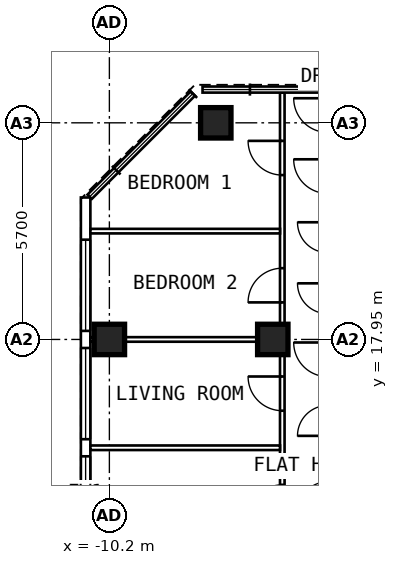
"""IFC4 building model, lengths in metres.
Left out: names, types, materials, properties, quantities, classifications, styles, units other than length and angle.
Written with IfcOpenShell. Run it as: python <this file> out.ifc"""

import sys

from ifc_helpers import new_model, si_unit, direction, frame, frame_2d, origin, origin_2d, place, context, subcontext, project, spatial, rectangle, extrude, element, fill, save


model = new_model("IFC4")
c1 = context("Model", 3, precision=1e-05, world=origin(), true_north=direction((0.0, 1.0)))
c2 = subcontext(c1, "Body", "Model", "MODEL_VIEW")
j1 = project(units=[si_unit("LENGTHUNIT", "METRE"), si_unit("PLANEANGLEUNIT", "RADIAN")], contexts=[c1])
p1 = place(None, origin())
s1 = spatial("IfcSite", under=j1, at=p1, CompositionType="ELEMENT")
p2 = place(p1, origin())
s2 = spatial("IfcBuilding", under=s1, at=p2, CompositionType="ELEMENT")
p3 = place(p2, frame((0.0, 0.0, 292.6)))
s3 = spatial("IfcBuildingStorey", under=s2, at=p3, CompositionType="ELEMENT", Elevation=292.6)
for number, where, z_axis, x_axis in (
    (1, (-10.2, 17.95, 0.0), (0.0, 0.0, 1.0), (0.0, 1.0, 0.0)),
    (2, (-7.4, 23.65, 0.0), (0.0, 0.0, 1.0), (0.0, 1.0, 0.0)),
    (3, (-5.9, 17.95, 0.0), (0.0, 0.0, 1.0), (0.0, 1.0, 0.0)),
):
    element("IfcColumn", number, at=place(p3, frame(where, z_axis=z_axis, x_axis=x_axis)), inside=s3, PredefinedType="COLUMN", context=c2, shape_type="SweptSolid", body=[
        extrude(rectangle(XDim=0.8, YDim=0.8, at=origin_2d()), origin(), (0.0, 0.0, 1.0), 3.6),
    ])
p4 = place(p3, frame((-10.825, 6.148, 0.0), z_axis=(0.0, 0.0, 1.0), x_axis=(0.0, 1.0, 0.0)))
e4 = element("IfcWall", 4, at=p4, inside=s3, PredefinedType="SOLIDWALL", context=c2, shape_type="SweptSolid", body=[
    extrude(rectangle(XDim=15.537, YDim=0.25, at=frame_2d((7.769, 0.0))), origin(), (0.0, 0.0, 1.0), 3.35),
])
p5 = place(p4, frame((0.627, 0.0, 0.6)))
e5 = element("IfcOpeningElement", 5, at=p5, cuts=e4, PredefinedType="OPENING", context=c2, shape_type="SweptSolid", body=[
    extrude(rectangle(XDim=2.4, YDim=2.0, at=frame_2d((1.2, 1.0))), frame((0.0, 0.137, 0.0), z_axis=(0.0, -1.0, 0.0), x_axis=(1.0, 0.0, 0.0)), (0.0, 0.0, 1.0), 0.274),
])
p6 = place(p4, frame((3.477, 0.0, 0.6)))
e6 = element("IfcOpeningElement", 6, at=p6, cuts=e4, PredefinedType="OPENING", context=c2, shape_type="SweptSolid", body=[
    extrude(rectangle(XDim=2.4, YDim=2.0, at=frame_2d((1.2, 1.0))), frame((0.0, 0.137, 0.0), z_axis=(0.0, -1.0, 0.0), x_axis=(1.0, 0.0, 0.0)), (0.0, 0.0, 1.0), 0.274),
])
p7 = place(p4, frame((6.327, 0.0, 0.6)))
e7 = element("IfcOpeningElement", 7, at=p7, cuts=e4, PredefinedType="OPENING", context=c2, shape_type="SweptSolid", body=[
    extrude(rectangle(XDim=2.4, YDim=2.0, at=frame_2d((1.2, 1.0))), frame((0.0, 0.137, 0.0), z_axis=(0.0, -1.0, 0.0), x_axis=(1.0, 0.0, 0.0)), (0.0, 0.0, 1.0), 0.274),
])
p8 = place(p4, frame((9.177, 0.0, 0.6)))
e8 = element("IfcOpeningElement", 8, at=p8, cuts=e4, PredefinedType="OPENING", context=c2, shape_type="SweptSolid", body=[
    extrude(rectangle(XDim=2.4, YDim=2.0, at=frame_2d((1.2, 1.0))), frame((0.0, 0.137, 0.0), z_axis=(0.0, -1.0, 0.0), x_axis=(1.0, 0.0, 0.0)), (0.0, 0.0, 1.0), 0.274),
])
p9 = place(p4, frame((12.027, 0.0, 0.6)))
e9 = element("IfcOpeningElement", 9, at=p9, cuts=e4, PredefinedType="OPENING", context=c2, shape_type="SweptSolid", body=[
    extrude(rectangle(XDim=2.4, YDim=2.0, at=frame_2d((1.2, 1.0))), frame((0.0, 0.137, 0.0), z_axis=(0.0, -1.0, 0.0), x_axis=(1.0, 0.0, 0.0)), (0.0, 0.0, 1.0), 0.274),
])
p10 = place(p3, frame((-5.65, 9.6, 0.0), z_axis=(0.0, 0.0, 1.0), x_axis=(0.0, 1.0, 0.0)))
e10 = element("IfcWall", 10, at=p10, inside=s3, PredefinedType="PARTITIONING", context=c2, shape_type="SweptSolid", body=[
    extrude(rectangle(XDim=14.845, YDim=0.12, at=frame_2d((7.422, 0.0))), origin(), (0.0, 0.0, 1.0), 3.35),
])
p11 = place(p10, frame((1.075, 0.0, 0.0)))
e11 = element("IfcOpeningElement", 11, at=p11, cuts=e10, PredefinedType="OPENING", context=c2, shape_type="SweptSolid", body=[
    extrude(rectangle(XDim=0.9, YDim=2.1, at=frame_2d((0.45, 1.05))), frame((0.0, 0.072, 0.0), z_axis=(0.0, -1.0, 0.0), x_axis=(1.0, 0.0, 0.0)), (0.0, 0.0, 1.0), 0.144),
])
p12 = place(p10, frame((3.625, 0.0, 0.0)))
e12 = element("IfcOpeningElement", 12, at=p12, cuts=e10, PredefinedType="OPENING", context=c2, shape_type="SweptSolid", body=[
    extrude(rectangle(XDim=0.9, YDim=2.1, at=frame_2d((0.45, 1.05))), frame((0.0, 0.072, 0.0), z_axis=(0.0, -1.0, 0.0), x_axis=(1.0, 0.0, 0.0)), (0.0, 0.0, 1.0), 0.144),
])
p13 = place(p10, frame((6.475, 0.0, 0.0)))
e13 = element("IfcOpeningElement", 13, at=p13, cuts=e10, PredefinedType="OPENING", context=c2, shape_type="SweptSolid", body=[
    extrude(rectangle(XDim=0.9, YDim=2.1, at=frame_2d((0.45, 1.05))), frame((0.0, 0.072, 0.0), z_axis=(0.0, -1.0, 0.0), x_axis=(1.0, 0.0, 0.0)), (0.0, 0.0, 1.0), 0.144),
])
p14 = place(p10, frame((9.325, 0.0, 0.0)))
e14 = element("IfcOpeningElement", 14, at=p14, cuts=e10, PredefinedType="OPENING", context=c2, shape_type="SweptSolid", body=[
    extrude(rectangle(XDim=0.9, YDim=2.1, at=frame_2d((0.45, 1.05))), frame((0.0, 0.072, 0.0), z_axis=(0.0, -1.0, 0.0), x_axis=(1.0, 0.0, 0.0)), (0.0, 0.0, 1.0), 0.144),
])
p15 = place(p10, frame((12.675, 0.0, 0.0)))
e15 = element("IfcOpeningElement", 15, at=p15, cuts=e10, PredefinedType="OPENING", context=c2, shape_type="SweptSolid", body=[
    extrude(rectangle(XDim=0.9, YDim=2.1, at=frame_2d((0.45, 1.05))), frame((0.0, 0.072, 0.0), z_axis=(0.0, -1.0, 0.0), x_axis=(1.0, 0.0, 0.0)), (0.0, 0.0, 1.0), 0.144),
])
p16 = place(p3, frame((-5.71, 15.1, 0.0), z_axis=(0.0, 0.0, 1.0), x_axis=(-1.0, 0.0, 0.0)))
e16 = element("IfcWall", 16, at=p16, inside=s3, PredefinedType="PARTITIONING", context=c2, shape_type="SweptSolid", body=[
    extrude(rectangle(XDim=4.99, YDim=0.12, at=frame_2d((2.495, 0.0))), origin(), (0.0, 0.0, 1.0), 3.35),
])
p17 = place(p3, frame((-5.71, 17.95, 0.0), z_axis=(0.0, 0.0, 1.0), x_axis=(-1.0, 0.0, 0.0)))
e17 = element("IfcWall", 17, at=p17, inside=s3, PredefinedType="PARTITIONING", context=c2, shape_type="SweptSolid", body=[
    extrude(rectangle(XDim=4.99, YDim=0.12, at=frame_2d((2.495, 0.0))), origin(), (0.0, 0.0, 1.0), 2.45),
])
p18 = place(p3, frame((-5.71, 20.8, 0.0), z_axis=(0.0, 0.0, 1.0), x_axis=(-1.0, 0.0, 0.0)))
e18 = element("IfcWall", 18, at=p18, inside=s3, PredefinedType="PARTITIONING", context=c2, shape_type="SweptSolid", body=[
    extrude(rectangle(XDim=4.99, YDim=0.12, at=frame_2d((2.495, 0.0))), origin(), (0.0, 0.0, 1.0), 3.35),
])
p19 = place(p7, origin())
e19 = element("IfcWindow", 19, at=p19, inside=s3, PartitioningType="SINGLE_PANEL", PredefinedType="WINDOW", context=c2, shape_type="SweptSolid", body=[
    extrude(rectangle(XDim=2.4, YDim=2.0, at=frame_2d((1.2, 1.0))), frame((0.0, 0.03, 0.0), z_axis=(0.0, -1.0, 0.0), x_axis=(1.0, 0.0, 0.0)), (0.0, 0.0, 1.0), 0.06),
])
fill(e7, e19)
p20 = place(p8, origin())
e20 = element("IfcWindow", 20, at=p20, inside=s3, PartitioningType="SINGLE_PANEL", PredefinedType="WINDOW", context=c2, shape_type="SweptSolid", body=[
    extrude(rectangle(XDim=2.4, YDim=2.0, at=frame_2d((1.2, 1.0))), frame((0.0, 0.03, 0.0), z_axis=(0.0, -1.0, 0.0), x_axis=(1.0, 0.0, 0.0)), (0.0, 0.0, 1.0), 0.06),
])
fill(e8, e20)
p21 = place(p9, origin())
e21 = element("IfcWindow", 21, at=p21, inside=s3, PartitioningType="SINGLE_PANEL", PredefinedType="WINDOW", context=c2, shape_type="SweptSolid", body=[
    extrude(rectangle(XDim=2.4, YDim=2.0, at=frame_2d((1.2, 1.0))), frame((0.0, 0.03, 0.0), z_axis=(0.0, -1.0, 0.0), x_axis=(1.0, 0.0, 0.0)), (0.0, 0.0, 1.0), 0.06),
])
fill(e9, e21)
p22 = place(p12, origin())
e22 = element("IfcDoor", 22, at=p22, inside=s3, OperationType="SINGLE_SWING_LEFT", PredefinedType="DOOR", context=c2, shape_type="SweptSolid", body=[
    extrude(rectangle(XDim=0.9, YDim=2.1, at=frame_2d((0.45, 1.05))), frame((0.0, 0.025, 0.0), z_axis=(0.0, -1.0, 0.0), x_axis=(1.0, 0.0, 0.0)), (0.0, 0.0, 1.0), 0.05),
])
fill(e12, e22)
p23 = place(p13, origin())
e23 = element("IfcDoor", 23, at=p23, inside=s3, OperationType="SINGLE_SWING_RIGHT", PredefinedType="DOOR", context=c2, shape_type="SweptSolid", body=[
    extrude(rectangle(XDim=0.9, YDim=2.1, at=frame_2d((0.45, 1.05))), frame((0.0, 0.025, 0.0), z_axis=(0.0, -1.0, 0.0), x_axis=(1.0, 0.0, 0.0)), (0.0, 0.0, 1.0), 0.05),
])
fill(e13, e23)
p24 = place(p14, origin())
e24 = element("IfcDoor", 24, at=p24, inside=s3, OperationType="SINGLE_SWING_LEFT", PredefinedType="DOOR", context=c2, shape_type="SweptSolid", body=[
    extrude(rectangle(XDim=0.9, YDim=2.1, at=frame_2d((0.45, 1.05))), frame((0.0, 0.025, 0.0), z_axis=(0.0, -1.0, 0.0), x_axis=(1.0, 0.0, 0.0)), (0.0, 0.0, 1.0), 0.05),
])
fill(e14, e24)
p25 = place(p15, origin())
e25 = element("IfcDoor", 25, at=p25, inside=s3, OperationType="SINGLE_SWING_RIGHT", PredefinedType="DOOR", context=c2, shape_type="SweptSolid", body=[
    extrude(rectangle(XDim=0.9, YDim=2.1, at=frame_2d((0.45, 1.05))), frame((0.0, 0.025, 0.0), z_axis=(0.0, -1.0, 0.0), x_axis=(1.0, 0.0, 0.0)), (0.0, 0.0, 1.0), 0.05),
])
fill(e15, e25)
save(model, sys.argv[1])
